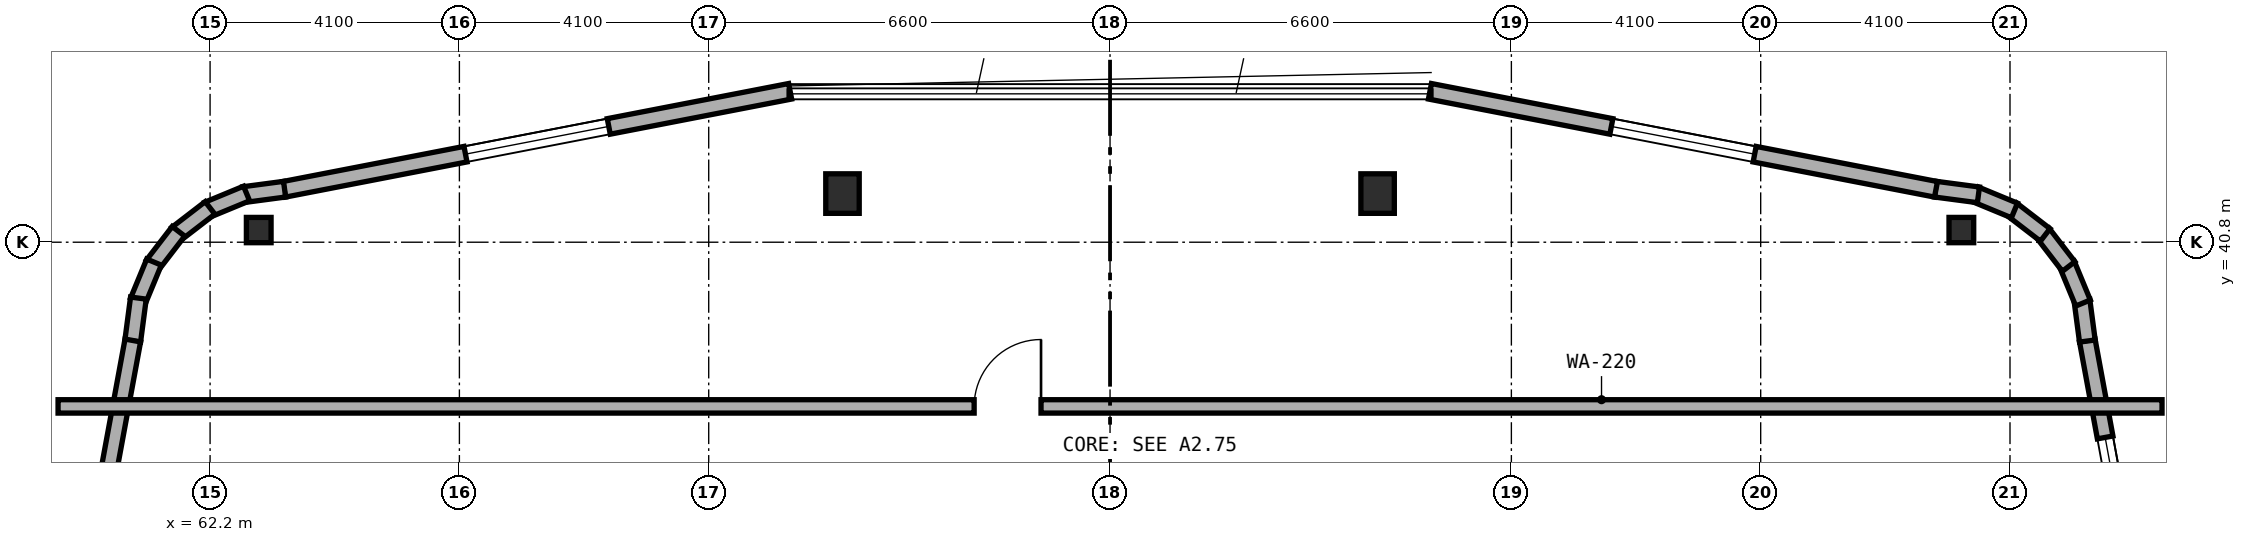
"""IFC4 building model, lengths in metres.
Left out: names, types, materials, properties, quantities, classifications, styles, units other than length and angle.
Written with IfcOpenShell. Run it as: python <this file> out.ifc"""

import sys

from ifc_helpers import new_model, si_unit, direction, frame, frame_2d, origin, origin_2d, place, context, subcontext, project, spatial, rectangle, i_section, extrude, element, fill, save


model = new_model("IFC4")
c1 = context("Model", 3, precision=1e-05, world=origin(), true_north=direction((0.0, 1.0)))
c2 = subcontext(c1, "Body", "Model", "MODEL_VIEW")
j1 = project(units=[si_unit("LENGTHUNIT", "METRE"), si_unit("PLANEANGLEUNIT", "RADIAN")], contexts=[c1])
p1 = place(None, origin())
s1 = spatial("IfcSite", under=j1, at=p1, CompositionType="ELEMENT")
p2 = place(p1, origin())
s2 = spatial("IfcBuilding", under=s1, at=p2, CompositionType="ELEMENT")
p3 = place(p2, frame((0.0, 0.0, 119.5)))
s3 = spatial("IfcBuildingStorey", under=s2, at=p3, CompositionType="ELEMENT", Elevation=119.5)
for number, where, z_axis, x_axis in (
    (1, (72.6, 41.6, 0.0), (0.0, 0.0, 1.0), (1.0, 0.0, 0.0)),
    (2, (81.4, 41.6, 0.0), (0.0, 0.0, 1.0), (1.0, 0.0, 0.0)),
):
    element("IfcColumn", number, at=place(p3, frame(where, z_axis=z_axis, x_axis=x_axis)), inside=s3, PredefinedType="COLUMN", context=c2, shape_type="SweptSolid", body=[
        extrude(rectangle(XDim=0.55, YDim=0.65, at=origin_2d()), origin(), (0.0, 0.0, 1.0), 4.5),
    ])
for number, where, z_axis, x_axis in (
    (3, (91.0, 41.0, 0.0), (0.0, 0.0, 1.0), (1.0, 0.0, 0.0)),
    (4, (63.0, 41.0, 0.0), (0.0, 0.0, 1.0), (1.0, 0.0, 0.0)),
):
    element("IfcColumn", number, at=place(p3, frame(where, z_axis=z_axis, x_axis=x_axis)), inside=s3, PredefinedType="COLUMN", context=c2, shape_type="SweptSolid", body=[
        extrude(i_section(OverallWidth=0.406, OverallDepth=0.416, WebThickness=0.024, FlangeThickness=0.039, FilletRadius=0.015, at=origin_2d()), origin(), (0.0, 0.0, 1.0), 4.5),
    ])
p4 = place(p3, frame((94.682, 30.442, 0.0), z_axis=(0.0, 0.0, 1.0), x_axis=(-0.181209963057, 0.983444431215, 0.0)))
e5 = element("IfcWall", 5, at=p4, inside=s3, PredefinedType="STANDARD", context=c2, shape_type="SweptSolid", body=[
    extrude(rectangle(XDim=8.889, YDim=0.26, at=frame_2d((4.445, 0.0))), origin(), (0.0, 0.0, 1.0), 4.25),
])
p5 = place(p4, frame((1.515, 0.0, 0.8)))
e6 = element("IfcOpeningElement", 6, at=p5, cuts=e5, PredefinedType="OPENING", context=c2, shape_type="SweptSolid", body=[
    extrude(rectangle(XDim=2.4, YDim=1.6, at=frame_2d((1.2, 0.8))), frame((0.0, 0.14, 0.0), z_axis=(0.0, -1.0, 0.0), x_axis=(1.0, 0.0, 0.0)), (0.0, 0.0, 1.0), 0.28),
])
p6 = place(p4, frame((6.068, 0.0, 0.85)))
e7 = element("IfcOpeningElement", 7, at=p6, cuts=e5, PredefinedType="OPENING", context=c2, shape_type="SweptSolid", body=[
    extrude(rectangle(XDim=1.2, YDim=1.5, at=frame_2d((0.6, 0.75))), frame((0.0, 0.14, 0.0), z_axis=(0.0, -1.0, 0.0), x_axis=(1.0, 0.0, 0.0)), (0.0, 0.0, 1.0), 0.28),
])
p7 = place(p3, frame((93.072, 39.175, 0.0), z_axis=(0.0, 0.0, 1.0), x_axis=(-0.131667498923, 0.991293937098, 0.0)))
e8 = element("IfcWall", 8, at=p7, inside=s3, PredefinedType="STANDARD", context=c2, shape_type="SweptSolid", body=[
    extrude(rectangle(XDim=0.677, YDim=0.26, at=frame_2d((0.338, 0.0))), origin(), (0.0, 0.0, 1.0), 4.25),
])
p8 = place(p3, frame((93.001, 39.8, 0.0), z_axis=(0.0, 0.0, 1.0), x_axis=(-0.381988976935, 0.924166879681, 0.0)))
e9 = element("IfcWall", 9, at=p8, inside=s3, PredefinedType="STANDARD", context=c2, shape_type="SweptSolid", body=[
    extrude(rectangle(XDim=0.693, YDim=0.26, at=frame_2d((0.347, 0.0))), origin(), (0.0, 0.0, 1.0), 4.25),
])
for number, where, z_axis, x_axis in (
    (10, (92.764, 40.401, 0.0), (0.0, 0.0, 1.0), (-0.609, 0.793, 0.0)),
    (11, (92.379, 40.92, 0.0), (0.0, 0.0, 1.0), (-0.793, 0.61, 0.0)),
):
    element("IfcWall", number, at=place(p3, frame(where, z_axis=z_axis, x_axis=x_axis)), inside=s3, PredefinedType="STANDARD", context=c2, shape_type="SweptSolid", body=[
        extrude(rectangle(XDim=0.694, YDim=0.26, at=frame_2d((0.347, 0.0))), origin(), (0.0, 0.0, 1.0), 4.25),
    ])
p9 = place(p3, frame((91.873, 41.322, 0.0), z_axis=(0.0, 0.0, 1.0), x_axis=(-0.92421822618, 0.381864727877, 0.0)))
e12 = element("IfcWall", 12, at=p9, inside=s3, PredefinedType="STANDARD", context=c2, shape_type="SweptSolid", body=[
    extrude(rectangle(XDim=0.694, YDim=0.26, at=frame_2d((0.347, 0.0))), origin(), (0.0, 0.0, 1.0), 4.25),
])
p10 = place(p3, frame((91.281, 41.579, 0.0), z_axis=(0.0, 0.0, 1.0), x_axis=(-0.991433279471, 0.130614135366, 0.0)))
e13 = element("IfcWall", 13, at=p10, inside=s3, PredefinedType="STANDARD", context=c2, shape_type="SweptSolid", body=[
    extrude(rectangle(XDim=0.712, YDim=0.26, at=frame_2d((0.356, 0.0))), origin(), (0.0, 0.0, 1.0), 4.25),
])
p11 = place(p3, frame((90.583, 41.67, 0.0), z_axis=(0.0, 0.0, 1.0), x_axis=(-0.981750199588, 0.190175039396, 0.0)))
e14 = element("IfcWall", 14, at=p11, inside=s3, PredefinedType="STANDARD", context=c2, shape_type="SweptSolid", body=[
    extrude(rectangle(XDim=8.477, YDim=0.26, at=frame_2d((4.238, 0.0))), origin(), (0.0, 0.0, 1.0), 4.25),
])
p12 = place(p11, frame((3.038, 0.0, 0.8)))
e15 = element("IfcOpeningElement", 15, at=p12, cuts=e14, PredefinedType="OPENING", context=c2, shape_type="SweptSolid", body=[
    extrude(rectangle(XDim=2.4, YDim=1.6, at=frame_2d((1.2, 0.8))), frame((0.0, 0.14, 0.0), z_axis=(0.0, -1.0, 0.0), x_axis=(1.0, 0.0, 0.0)), (0.0, 0.0, 1.0), 0.28),
])
p13 = place(p3, frame((71.739, 43.282, 0.0), z_axis=(0.0, 0.0, 1.0), x_axis=(-0.981750199588, -0.190175039396, 0.0)))
e16 = element("IfcWall", 16, at=p13, inside=s3, PredefinedType="STANDARD", context=c2, shape_type="SweptSolid", body=[
    extrude(rectangle(XDim=8.477, YDim=0.26, at=frame_2d((4.238, 0.0))), origin(), (0.0, 0.0, 1.0), 4.25),
])
p14 = place(p13, frame((3.038, 0.0, 0.8)))
e17 = element("IfcOpeningElement", 17, at=p14, cuts=e16, PredefinedType="OPENING", context=c2, shape_type="SweptSolid", body=[
    extrude(rectangle(XDim=2.4, YDim=1.6, at=frame_2d((1.2, 0.8))), frame((0.0, 0.14, 0.0), z_axis=(0.0, -1.0, 0.0), x_axis=(1.0, 0.0, 0.0)), (0.0, 0.0, 1.0), 0.28),
])
p15 = place(p3, frame((63.425, 41.672, 0.0), z_axis=(0.0, 0.0, 1.0), x_axis=(-0.991300187529, -0.13162043232, 0.0)))
e18 = element("IfcWall", 18, at=p15, inside=s3, PredefinedType="STANDARD", context=c2, shape_type="SweptSolid", body=[
    extrude(rectangle(XDim=0.677, YDim=0.26, at=frame_2d((0.338, 0.0))), origin(), (0.0, 0.0, 1.0), 4.25),
])
for number, where, z_axis, x_axis in (
    (19, (62.8, 41.601, 0.0), (0.0, 0.0, 1.0), (-0.924, -0.382, 0.0)),
    (20, (62.199, 41.364, 0.0), (0.0, 0.0, 1.0), (-0.793, -0.61, 0.0)),
    (21, (61.68, 40.979, 0.0), (0.0, 0.0, 1.0), (-0.609, -0.793, 0.0)),
):
    element("IfcWall", number, at=place(p3, frame(where, z_axis=z_axis, x_axis=x_axis)), inside=s3, PredefinedType="STANDARD", context=c2, shape_type="SweptSolid", body=[
        extrude(rectangle(XDim=0.694, YDim=0.26, at=frame_2d((0.347, 0.0))), origin(), (0.0, 0.0, 1.0), 4.25),
    ])
p16 = place(p3, frame((61.278, 40.473, 0.0), z_axis=(0.0, 0.0, 1.0), x_axis=(-0.382289608286, -0.924042561464, 0.0)))
e22 = element("IfcWall", 22, at=p16, inside=s3, PredefinedType="STANDARD", context=c2, shape_type="SweptSolid", body=[
    extrude(rectangle(XDim=0.694, YDim=0.26, at=frame_2d((0.347, 0.0))), origin(), (0.0, 0.0, 1.0), 4.25),
])
p17 = place(p3, frame((61.021, 39.881, 0.0), z_axis=(0.0, 0.0, 1.0), x_axis=(-0.130614135366, -0.991433279471, 0.0)))
e23 = element("IfcWall", 23, at=p17, inside=s3, PredefinedType="STANDARD", context=c2, shape_type="SweptSolid", body=[
    extrude(rectangle(XDim=0.712, YDim=0.26, at=frame_2d((0.356, 0.0))), origin(), (0.0, 0.0, 1.0), 4.25),
])
p18 = place(p3, frame((60.929, 39.184, 0.0), z_axis=(0.0, 0.0, 1.0), x_axis=(-0.181209963057, -0.983444431215, 0.0)))
e24 = element("IfcWall", 24, at=p18, inside=s3, PredefinedType="STANDARD", context=c2, shape_type="SweptSolid", body=[
    extrude(rectangle(XDim=8.889, YDim=0.26, at=frame_2d((4.445, 0.0))), origin(), (0.0, 0.0, 1.0), 4.25),
])
p19 = place(p18, frame((3.855, 0.0, 0.8)))
e25 = element("IfcOpeningElement", 25, at=p19, cuts=e24, PredefinedType="OPENING", context=c2, shape_type="SweptSolid", body=[
    extrude(rectangle(XDim=2.4, YDim=1.6, at=frame_2d((1.2, 0.8))), frame((0.0, 0.14, 0.0), z_axis=(0.0, -1.0, 0.0), x_axis=(1.0, 0.0, 0.0)), (0.0, 0.0, 1.0), 0.28),
])
p20 = place(p3, frame((59.7, 38.1, 0.0), z_axis=(0.0, 0.0, 1.0), x_axis=(1.0, 0.0, 0.0)))
e26 = element("IfcWall", 26, at=p20, inside=s3, PredefinedType="SOLIDWALL", context=c2, shape_type="SweptSolid", body=[
    extrude(rectangle(XDim=34.6, YDim=0.22, at=frame_2d((17.3, 0.0))), origin(), (0.0, 0.0, 1.0), 3.825),
])
p21 = place(p20, frame((15.065, 0.0, 0.0)))
e27 = element("IfcOpeningElement", 27, at=p21, cuts=e26, PredefinedType="OPENING", context=c2, shape_type="SweptSolid", body=[
    extrude(rectangle(XDim=1.1, YDim=2.1, at=frame_2d((0.55, 1.05))), frame((0.0, 0.12, 0.0), z_axis=(0.0, -1.0, 0.0), x_axis=(1.0, 0.0, 0.0)), (0.0, 0.0, 1.0), 0.24),
])
p22 = place(p6, origin())
e28 = element("IfcWindow", 28, at=p22, inside=s3, PartitioningType="SINGLE_PANEL", PredefinedType="WINDOW", context=c2, shape_type="SweptSolid", body=[
    extrude(rectangle(XDim=1.2, YDim=1.5, at=frame_2d((0.6, 0.75))), frame((0.0, 0.03, 0.0), z_axis=(0.0, -1.0, 0.0), x_axis=(1.0, 0.0, 0.0)), (0.0, 0.0, 1.0), 0.06),
])
fill(e7, e28)
p23 = place(p12, origin())
e29 = element("IfcWindow", 29, at=p23, inside=s3, PartitioningType="SINGLE_PANEL", PredefinedType="WINDOW", context=c2, shape_type="SweptSolid", body=[
    extrude(rectangle(XDim=2.4, YDim=1.6, at=frame_2d((1.2, 0.8))), frame((0.0, 0.03, 0.0), z_axis=(0.0, -1.0, 0.0), x_axis=(1.0, 0.0, 0.0)), (0.0, 0.0, 1.0), 0.06),
])
fill(e15, e29)
p24 = place(p14, origin())
e30 = element("IfcWindow", 30, at=p24, inside=s3, PartitioningType="SINGLE_PANEL", PredefinedType="WINDOW", context=c2, shape_type="SweptSolid", body=[
    extrude(rectangle(XDim=2.4, YDim=1.6, at=frame_2d((1.2, 0.8))), frame((0.0, 0.03, 0.0), z_axis=(0.0, -1.0, 0.0), x_axis=(1.0, 0.0, 0.0)), (0.0, 0.0, 1.0), 0.06),
])
fill(e17, e30)
p25 = place(p21, origin())
e31 = element("IfcDoor", 31, at=p25, inside=s3, OperationType="SINGLE_SWING_RIGHT", PredefinedType="DOOR", context=c2, shape_type="SweptSolid", body=[
    extrude(rectangle(XDim=1.1, YDim=2.1, at=frame_2d((0.55, 1.05))), frame((0.0, 0.025, 0.0), z_axis=(0.0, -1.0, 0.0), x_axis=(1.0, 0.0, 0.0)), (0.0, 0.0, 1.0), 0.05),
])
fill(e27, e31)
save(model, sys.argv[1])
